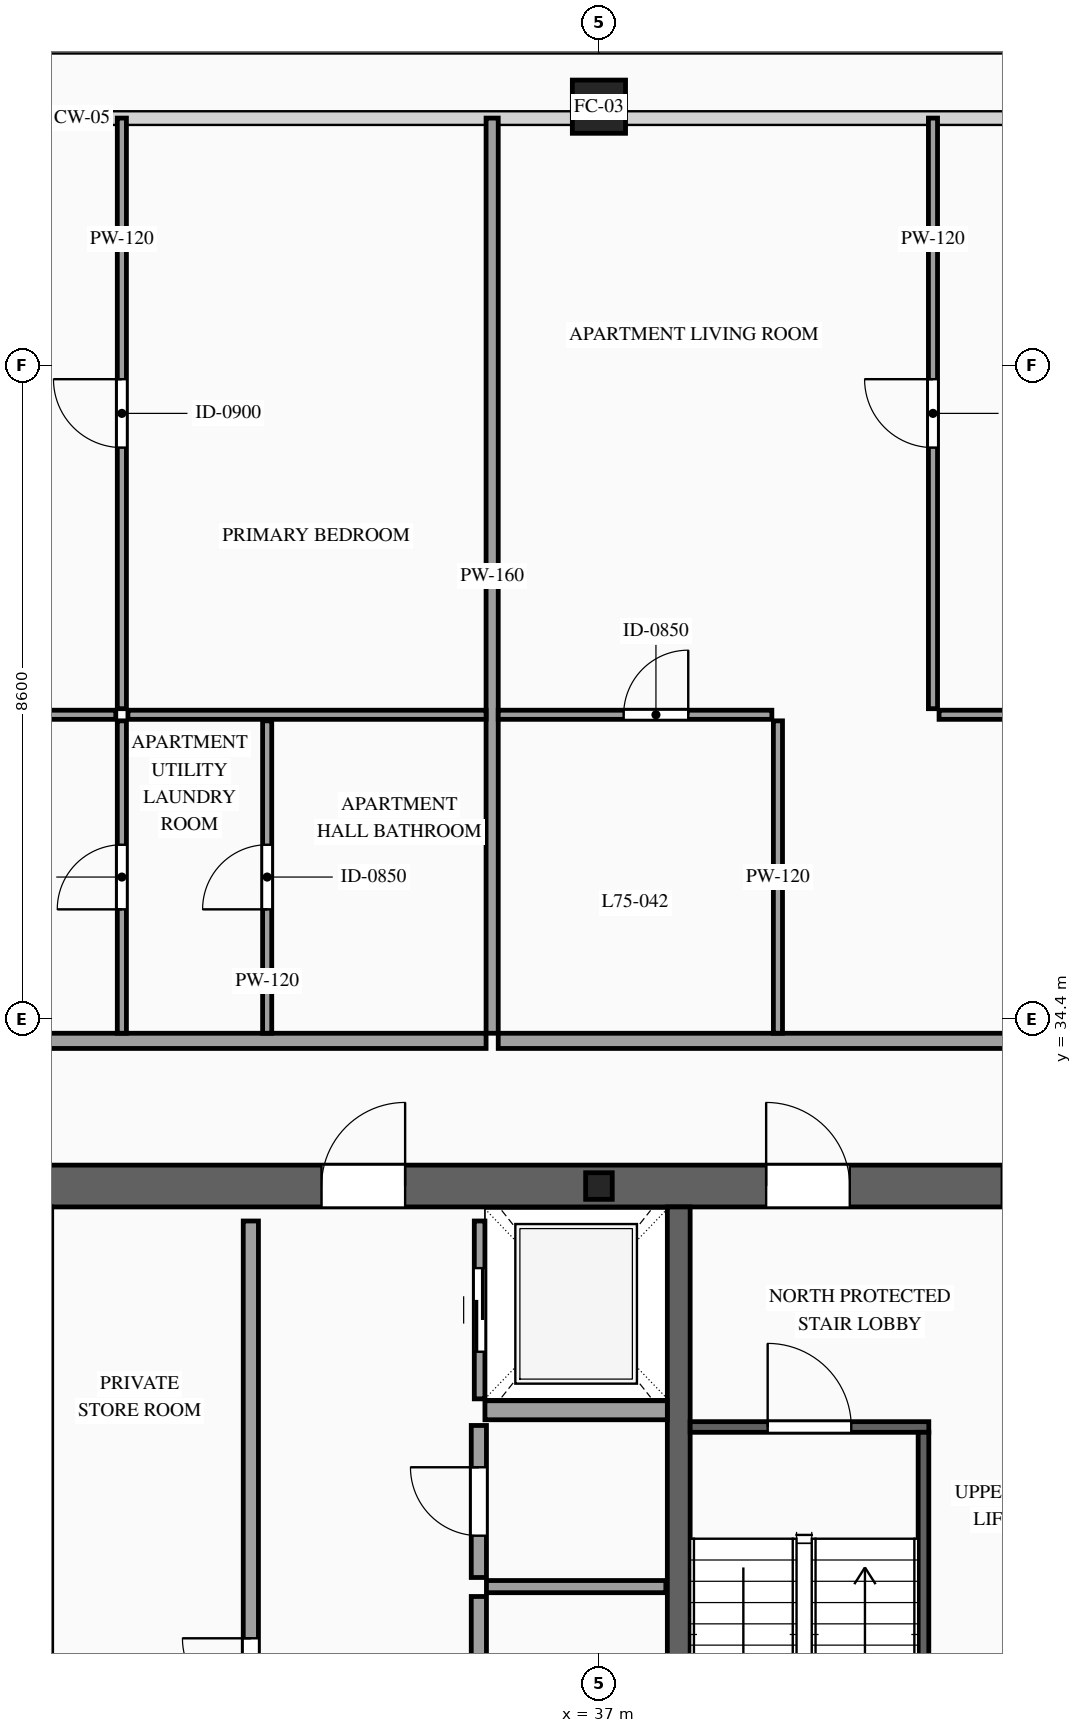
"""IFC4 building model, lengths in metres.
Left out: names, types, materials, properties, quantities, classifications, styles, units other than length and angle.
Written with IfcOpenShell. Run it as: python <this file> out.ifc"""

import sys

from ifc_helpers import new_model, si_unit, direction, frame, frame_2d, origin, origin_2d, place, context, subcontext, project, spatial, rectangle, hollow_rectangle, i_section, extrude, source, transform, mapped, element, fill, save


model = new_model("IFC4")
c1 = context("Model", 3, precision=1e-05, world=origin(), true_north=direction((0.0, 1.0)))
c2 = subcontext(c1, "Body", "Model", "MODEL_VIEW")
j1 = project(units=[si_unit("LENGTHUNIT", "METRE"), si_unit("PLANEANGLEUNIT", "RADIAN")], contexts=[c1])
p1 = place(None, origin())
s1 = spatial("IfcSite", under=j1, at=p1, CompositionType="ELEMENT")
p2 = place(p1, origin())
s2 = spatial("IfcBuilding", under=s1, at=p2, CompositionType="ELEMENT")
p3 = place(p2, frame((0.0, 0.0, 282.1)))
s3 = spatial("IfcBuildingStorey", under=s2, at=p3, CompositionType="ELEMENT", Elevation=282.1)
p4 = place(p3, frame((23.525, 32.2, 0.0), z_axis=(0.0, 0.0, 1.0), x_axis=(1.0, 0.0, 0.0)))
e1 = element("IfcWall", 1, at=p4, inside=s3, PredefinedType="SHEAR", context=c2, shape_type="SweptSolid", body=[
    extrude(rectangle(XDim=26.95, YDim=0.55, at=frame_2d((13.475, 0.0))), origin(), (0.0, 0.0, 1.0), 3.5),
])
p5 = place(p4, frame((4.545, 0.0, 0.0)))
e2 = element("IfcOpeningElement", 2, at=p5, cuts=e1, PredefinedType="OPENING", context=c2, shape_type="SweptSolid", body=[
    extrude(rectangle(XDim=0.9, YDim=2.15, at=frame_2d((0.45, 1.075))), frame((0.0, 0.29, 0.0), z_axis=(0.0, -1.0, 0.0), x_axis=(1.0, 0.0, 0.0)), (0.0, 0.0, 1.0), 0.58),
])
p6 = place(p4, frame((9.825, 0.0, 0.0)))
e3 = element("IfcOpeningElement", 3, at=p6, cuts=e1, PredefinedType="OPENING", context=c2, shape_type="SweptSolid", body=[
    extrude(rectangle(XDim=1.1, YDim=2.2, at=frame_2d((0.55, 1.1))), frame((0.0, 0.29, 0.0), z_axis=(0.0, -1.0, 0.0), x_axis=(1.0, 0.0, 0.0)), (0.0, 0.0, 1.0), 0.58),
])
p7 = place(p4, frame((15.675, 0.0, 0.0)))
e4 = element("IfcOpeningElement", 4, at=p7, cuts=e1, PredefinedType="OPENING", context=c2, shape_type="SweptSolid", body=[
    extrude(rectangle(XDim=1.1, YDim=2.2, at=frame_2d((0.55, 1.1))), frame((0.0, 0.29, 0.0), z_axis=(0.0, -1.0, 0.0), x_axis=(1.0, 0.0, 0.0)), (0.0, 0.0, 1.0), 0.58),
])
p8 = place(p4, frame((18.775, 0.0, 0.0)))
e5 = element("IfcOpeningElement", 5, at=p8, cuts=e1, PredefinedType="OPENING", context=c2, shape_type="SweptSolid", body=[
    extrude(rectangle(XDim=1.1, YDim=2.2, at=frame_2d((0.55, 1.1))), frame((0.0, 0.29, 0.0), z_axis=(0.0, -1.0, 0.0), x_axis=(1.0, 0.0, 0.0)), (0.0, 0.0, 1.0), 0.58),
])
m1 = source(origin(), c2, "Body", "SweptSolid", [
    extrude(rectangle(XDim=12.25, YDim=0.3, at=frame_2d((6.125, 0.0))), origin(), (0.0, 0.0, 1.0), 3.5),
])
p9 = place(p3, frame((38.05, 19.675, 0.0), z_axis=(0.0, 0.0, 1.0), x_axis=(0.0, 1.0, 0.0)))
e6 = element("IfcWall", 6, at=p9, inside=s3, PredefinedType="SOLIDWALL", context=c2, shape_type="MappedRepresentation", body=[
    mapped(m1, transform((0.0, 0.0, 0.0), scale=1.0)),
])
m2 = source(origin(), c2, "Body", "SweptSolid", [
    extrude(i_section(OverallWidth=0.35, OverallDepth=0.35, WebThickness=0.012, FlangeThickness=0.019, at=origin_2d()), origin(), (0.0, 0.0, 1.0), 3.5),
])
p10 = place(p3, frame((37.0, 32.2, 0.0), z_axis=(0.0, 0.0, 1.0), x_axis=(1.0, 0.0, 0.0)))
e7 = element("IfcColumn", 7, at=p10, inside=s3, PredefinedType="COLUMN", context=c2, shape_type="MappedRepresentation", body=[
    mapped(m2, transform((0.0, 0.0, 0.0), scale=1.0)),
])
m3 = source(origin(), c2, "Body", "SweptSolid", [
    extrude(hollow_rectangle(XDim=0.7, YDim=0.7, WallThickness=0.032, at=origin_2d()), origin(), (0.0, 0.0, 1.0), 3.28),
])
p11 = place(p3, frame((37.0, 46.4, 0.0), z_axis=(0.0, 0.0, 1.0), x_axis=(1.0, 0.0, 0.0)))
e8 = element("IfcColumn", 8, at=p11, inside=s3, PredefinedType="COLUMN", context=c2, shape_type="MappedRepresentation", body=[
    mapped(m3, transform((0.0, 0.0, 0.0), scale=1.0)),
])
p12 = place(p3, frame((35.43, 29.4, 0.0), z_axis=(0.0, 0.0, 1.0), x_axis=(0.0, 1.0, 0.0)))
e9 = element("IfcWall", 9, at=p12, inside=s3, PredefinedType="SOLIDWALL", context=c2, shape_type="SweptSolid", body=[
    extrude(rectangle(XDim=2.34, YDim=0.14, at=frame_2d((1.17, 0.0))), origin(), (0.0, 0.0, 1.0), 3.28),
])
p13 = place(p12, frame((0.62, 0.0, 0.0)))
e10 = element("IfcOpeningElement", 10, at=p13, cuts=e9, PredefinedType="OPENING", context=c2, shape_type="SweptSolid", body=[
    extrude(rectangle(XDim=1.1, YDim=2.2, at=frame_2d((0.55, 1.1))), frame((0.0, 0.085, 0.0), z_axis=(0.0, -1.0, 0.0), x_axis=(1.0, 0.0, 0.0)), (0.0, 0.0, 1.0), 0.17),
])
m4 = source(origin(), c2, "Body", "SweptSolid", [
    extrude(rectangle(XDim=2.4, YDim=0.25, at=frame_2d((1.2, 0.0))), origin(), (0.0, 0.0, 1.0), 3.28),
])
p14 = place(p3, frame((35.5, 29.25, 0.0), z_axis=(0.0, 0.0, 1.0), x_axis=(1.0, 0.0, 0.0)))
e11 = element("IfcWall", 11, at=p14, inside=s3, PredefinedType="SOLIDWALL", context=c2, shape_type="MappedRepresentation", body=[
    mapped(m4, transform((0.0, 0.0, 0.0), scale=1.0)),
])
p15 = place(p3, frame((38.2, 29.03, 0.0), z_axis=(0.0, 0.0, 1.0), x_axis=(1.0, 0.0, 0.0)))
e12 = element("IfcWall", 12, at=p15, inside=s3, PredefinedType="SOLIDWALL", context=c2, shape_type="SweptSolid", body=[
    extrude(rectangle(XDim=3.14, YDim=0.14, at=frame_2d((1.57, 0.0))), origin(), (0.0, 0.0, 1.0), 3.28),
])
p16 = place(p15, frame((1.02, 0.0, 0.0)))
e13 = element("IfcOpeningElement", 13, at=p16, cuts=e12, PredefinedType="OPENING", context=c2, shape_type="SweptSolid", body=[
    extrude(rectangle(XDim=1.1, YDim=2.2, at=frame_2d((0.55, 1.1))), frame((0.0, 0.085, 0.0), z_axis=(0.0, -1.0, 0.0), x_axis=(1.0, 0.0, 0.0)), (0.0, 0.0, 1.0), 0.17),
])
m5 = source(origin(), c2, "Body", "SweptSolid", [
    extrude(rectangle(XDim=8.94, YDim=0.14, at=frame_2d((4.47, 0.0))), origin(), (0.0, 0.0, 1.0), 3.28),
])
p17 = place(p3, frame((41.27, 20.02, 0.0), z_axis=(0.0, 0.0, 1.0), x_axis=(0.0, 1.0, 0.0)))
e14 = element("IfcWall", 14, at=p17, inside=s3, PredefinedType="SOLIDWALL", context=c2, shape_type="MappedRepresentation", body=[
    mapped(m5, transform((0.0, 0.0, 0.0), scale=1.0)),
])
p18 = place(p3, frame((32.42, 19.86, 0.0), z_axis=(0.0, 0.0, 1.0), x_axis=(0.0, 1.0, 0.0)))
e15 = element("IfcWall", 15, at=p18, inside=s3, PredefinedType="PARTITIONING", context=c2, shape_type="SweptSolid", body=[
    extrude(rectangle(XDim=11.88, YDim=0.2, at=frame_2d((5.94, 0.0))), origin(), (0.0, 0.0, 1.0), 3.28),
])
p19 = place(p18, frame((5.49, 0.0, 0.0)))
e16 = element("IfcOpeningElement", 16, at=p19, cuts=e15, PredefinedType="OPENING", context=c2, shape_type="SweptSolid", body=[
    extrude(rectangle(XDim=0.9, YDim=2.15, at=frame_2d((0.45, 1.075))), frame((0.0, 0.115, 0.0), z_axis=(0.0, -1.0, 0.0), x_axis=(1.0, 0.0, 0.0)), (0.0, 0.0, 1.0), 0.23),
])
p20 = place(p3, frame((35.42, 19.86, 0.0), z_axis=(0.0, 0.0, 1.0), x_axis=(0.0, 1.0, 0.0)))
e17 = element("IfcWall", 17, at=p20, inside=s3, PredefinedType="PARTITIONING", context=c2, shape_type="SweptSolid", body=[
    extrude(rectangle(XDim=6.94, YDim=0.2, at=frame_2d((3.47, 0.0))), origin(), (0.0, 0.0, 1.0), 3.28),
])
p21 = place(p20, frame((3.02, 0.0, 0.0)))
e18 = element("IfcOpeningElement", 18, at=p21, cuts=e17, PredefinedType="OPENING", context=c2, shape_type="SweptSolid", body=[
    extrude(rectangle(XDim=0.9, YDim=2.15, at=frame_2d((0.45, 1.075))), frame((0.0, 0.115, 0.0), z_axis=(0.0, -1.0, 0.0), x_axis=(1.0, 0.0, 0.0)), (0.0, 0.0, 1.0), 0.23),
])
p22 = place(p3, frame((35.42, 27.05, 0.0), z_axis=(0.0, 0.0, 1.0), x_axis=(0.0, 1.0, 0.0)))
e19 = element("IfcWall", 19, at=p22, inside=s3, PredefinedType="PARTITIONING", context=c2, shape_type="SweptSolid", body=[
    extrude(rectangle(XDim=2.0, YDim=0.2, at=frame_2d((1.0, 0.0))), origin(), (0.0, 0.0, 1.0), 3.28),
])
p23 = place(p22, frame((0.55, 0.0, 0.0)))
e20 = element("IfcOpeningElement", 20, at=p23, cuts=e19, PredefinedType="OPENING", context=c2, shape_type="SweptSolid", body=[
    extrude(rectangle(XDim=0.9, YDim=2.15, at=frame_2d((0.45, 1.075))), frame((0.0, 0.115, 0.0), z_axis=(0.0, -1.0, 0.0), x_axis=(1.0, 0.0, 0.0)), (0.0, 0.0, 1.0), 0.23),
])
m6 = source(origin(), c2, "Body", "SweptSolid", [
    extrude(rectangle(XDim=2.36, YDim=0.16, at=frame_2d((1.18, 0.0))), origin(), (0.0, 0.0, 1.0), 3.28),
])
p24 = place(p3, frame((35.52, 26.93, 0.0), z_axis=(0.0, 0.0, 1.0), x_axis=(1.0, 0.0, 0.0)))
e21 = element("IfcWall", 21, at=p24, inside=s3, PredefinedType="PARTITIONING", context=c2, shape_type="MappedRepresentation", body=[
    mapped(m6, transform((0.0, 0.0, 0.0), scale=1.0)),
])
p25 = place(p3, frame((19.44, 34.11, 0.0), z_axis=(0.0, 0.0, 1.0), x_axis=(1.0, 0.0, 0.0)))
e22 = element("IfcWall", 22, at=p25, inside=s3, PredefinedType="PARTITIONING", context=c2, shape_type="SweptSolid", body=[
    extrude(rectangle(XDim=16.075, YDim=0.2, at=frame_2d((8.038, 0.0))), origin(), (0.0, 0.0, 1.0), 3.28),
])
p26 = place(p25, frame((6.982, 0.0, 0.0)))
e23 = element("IfcOpeningElement", 23, at=p26, cuts=e22, PredefinedType="OPENING", context=c2, shape_type="SweptSolid", body=[
    extrude(rectangle(XDim=1.0, YDim=2.2, at=frame_2d((0.5, 1.1))), frame((0.0, 0.115, 0.0), z_axis=(0.0, -1.0, 0.0), x_axis=(1.0, 0.0, 0.0)), (0.0, 0.0, 1.0), 0.23),
])
m7 = source(origin(), c2, "Body", "SweptSolid", [
    extrude(rectangle(XDim=12.04, YDim=0.16, at=frame_2d((6.02, 0.0))), origin(), (0.0, 0.0, 1.0), 3.28),
])
p27 = place(p3, frame((35.595, 34.21, 0.0), z_axis=(0.0, 0.0, 1.0), x_axis=(0.0, 1.0, 0.0)))
e24 = element("IfcWall", 24, at=p27, inside=s3, PredefinedType="PARTITIONING", context=c2, shape_type="MappedRepresentation", body=[
    mapped(m7, transform((0.0, 0.0, 0.0), scale=1.0)),
])
p28 = place(p3, frame((32.635, 34.21, 0.0), z_axis=(0.0, 0.0, 1.0), x_axis=(0.0, 1.0, 0.0)))
e25 = element("IfcWall", 25, at=p28, inside=s3, PredefinedType="PARTITIONING", context=c2, shape_type="SweptSolid", body=[
    extrude(rectangle(XDim=4.11, YDim=0.12, at=frame_2d((2.055, 0.0))), origin(), (0.0, 0.0, 1.0), 3.28),
])
p29 = place(p28, frame((1.63, 0.0, 0.0)))
e26 = element("IfcOpeningElement", 26, at=p29, cuts=e25, PredefinedType="OPENING", context=c2, shape_type="SweptSolid", body=[
    extrude(rectangle(XDim=0.85, YDim=2.1, at=frame_2d((0.425, 1.05))), frame((0.0, 0.075, 0.0), z_axis=(0.0, -1.0, 0.0), x_axis=(1.0, 0.0, 0.0)), (0.0, 0.0, 1.0), 0.15),
])
m8 = source(origin(), c2, "Body", "SweptSolid", [
    extrude(rectangle(XDim=4.712, YDim=0.12, at=frame_2d((2.356, 0.0))), origin(), (0.0, 0.0, 1.0), 3.28),
])
p30 = place(p3, frame((30.803, 38.4, 0.0), z_axis=(0.0, 0.0, 1.0), x_axis=(1.0, 0.0, 0.0)))
e27 = element("IfcWall", 27, at=p30, inside=s3, PredefinedType="PARTITIONING", context=c2, shape_type="MappedRepresentation", body=[
    mapped(m8, transform((0.0, 0.0, 0.0), scale=1.0)),
])
p31 = place(p3, frame((30.723, 38.48, 0.0), z_axis=(0.0, 0.0, 1.0), x_axis=(0.0, 1.0, 0.0)))
e28 = element("IfcWall", 28, at=p31, inside=s3, PredefinedType="PARTITIONING", context=c2, shape_type="SweptSolid", body=[
    extrude(rectangle(XDim=7.77, YDim=0.12, at=frame_2d((3.885, 0.0))), origin(), (0.0, 0.0, 1.0), 3.28),
])
p32 = place(p31, frame((3.435, 0.0, 0.0)))
e29 = element("IfcOpeningElement", 29, at=p32, cuts=e28, PredefinedType="OPENING", context=c2, shape_type="SweptSolid", body=[
    extrude(rectangle(XDim=0.9, YDim=2.15, at=frame_2d((0.45, 1.075))), frame((0.0, 0.075, 0.0), z_axis=(0.0, -1.0, 0.0), x_axis=(1.0, 0.0, 0.0)), (0.0, 0.0, 1.0), 0.15),
])
p33 = place(p3, frame((30.723, 34.21, 0.0), z_axis=(0.0, 0.0, 1.0), x_axis=(0.0, 1.0, 0.0)))
e30 = element("IfcWall", 30, at=p33, inside=s3, PredefinedType="PARTITIONING", context=c2, shape_type="SweptSolid", body=[
    extrude(rectangle(XDim=4.11, YDim=0.12, at=frame_2d((2.055, 0.0))), origin(), (0.0, 0.0, 1.0), 3.28),
])
p34 = place(p33, frame((1.63, 0.0, 0.0)))
e31 = element("IfcOpeningElement", 31, at=p34, cuts=e30, PredefinedType="OPENING", context=c2, shape_type="SweptSolid", body=[
    extrude(rectangle(XDim=0.85, YDim=2.1, at=frame_2d((0.425, 1.05))), frame((0.0, 0.075, 0.0), z_axis=(0.0, -1.0, 0.0), x_axis=(1.0, 0.0, 0.0)), (0.0, 0.0, 1.0), 0.15),
])
m9 = source(origin(), c2, "Body", "SweptSolid", [
    extrude(rectangle(XDim=5.403, YDim=0.12, at=frame_2d((2.702, 0.0))), origin(), (0.0, 0.0, 1.0), 3.28),
])
p35 = place(p3, frame((25.24, 38.4, 0.0), z_axis=(0.0, 0.0, 1.0), x_axis=(1.0, 0.0, 0.0)))
e32 = element("IfcWall", 32, at=p35, inside=s3, PredefinedType="PARTITIONING", context=c2, shape_type="MappedRepresentation", body=[
    mapped(m9, transform((0.0, 0.0, 0.0), scale=1.0)),
])
p36 = place(p3, frame((35.675, 34.11, 0.0), z_axis=(0.0, 0.0, 1.0), x_axis=(1.0, 0.0, 0.0)))
e33 = element("IfcWall", 33, at=p36, inside=s3, PredefinedType="PARTITIONING", context=c2, shape_type="SweptSolid", body=[
    extrude(rectangle(XDim=18.885, YDim=0.2, at=frame_2d((9.442, 0.0))), origin(), (0.0, 0.0, 1.0), 3.28),
])
p37 = place(p36, frame((6.668, 0.0, 0.0)))
e34 = element("IfcOpeningElement", 34, at=p37, cuts=e33, PredefinedType="OPENING", context=c2, shape_type="SweptSolid", body=[
    extrude(rectangle(XDim=1.0, YDim=2.2, at=frame_2d((0.5, 1.1))), frame((0.0, 0.115, 0.0), z_axis=(0.0, -1.0, 0.0), x_axis=(1.0, 0.0, 0.0)), (0.0, 0.0, 1.0), 0.23),
])
p38 = place(p3, frame((35.675, 38.4, 0.0), z_axis=(0.0, 0.0, 1.0), x_axis=(1.0, 0.0, 0.0)))
e35 = element("IfcWall", 35, at=p38, inside=s3, PredefinedType="PARTITIONING", context=c2, shape_type="SweptSolid", body=[
    extrude(rectangle(XDim=3.6, YDim=0.12, at=frame_2d((1.8, 0.0))), origin(), (0.0, 0.0, 1.0), 3.28),
])
p39 = place(p38, frame((1.65, 0.0, 0.0)))
e36 = element("IfcOpeningElement", 36, at=p39, cuts=e35, PredefinedType="OPENING", context=c2, shape_type="SweptSolid", body=[
    extrude(rectangle(XDim=0.85, YDim=2.1, at=frame_2d((0.425, 1.05))), frame((0.0, 0.075, 0.0), z_axis=(0.0, -1.0, 0.0), x_axis=(1.0, 0.0, 0.0)), (0.0, 0.0, 1.0), 0.15),
])
m10 = source(origin(), c2, "Body", "SweptSolid", [
    extrude(rectangle(XDim=4.11, YDim=0.12, at=frame_2d((2.055, 0.0))), origin(), (0.0, 0.0, 1.0), 3.28),
])
p40 = place(p3, frame((39.355, 34.21, 0.0), z_axis=(0.0, 0.0, 1.0), x_axis=(0.0, 1.0, 0.0)))
e37 = element("IfcWall", 37, at=p40, inside=s3, PredefinedType="PARTITIONING", context=c2, shape_type="MappedRepresentation", body=[
    mapped(m10, transform((0.0, 0.0, 0.0), scale=1.0)),
])
m11 = source(origin(), c2, "Body", "SweptSolid", [
    extrude(rectangle(XDim=8.213, YDim=0.12, at=frame_2d((4.106, 0.0))), origin(), (0.0, 0.0, 1.0), 3.28),
])
p41 = place(p3, frame((41.475, 38.4, 0.0), z_axis=(0.0, 0.0, 1.0), x_axis=(1.0, 0.0, 0.0)))
e38 = element("IfcWall", 38, at=p41, inside=s3, PredefinedType="PARTITIONING", context=c2, shape_type="MappedRepresentation", body=[
    mapped(m11, transform((0.0, 0.0, 0.0), scale=1.0)),
])
p42 = place(p3, frame((41.395, 38.48, 0.0), z_axis=(0.0, 0.0, 1.0), x_axis=(0.0, 1.0, 0.0)))
e39 = element("IfcWall", 39, at=p42, inside=s3, PredefinedType="PARTITIONING", context=c2, shape_type="SweptSolid", body=[
    extrude(rectangle(XDim=7.77, YDim=0.12, at=frame_2d((3.885, 0.0))), origin(), (0.0, 0.0, 1.0), 3.28),
])
p43 = place(p42, frame((3.435, 0.0, 0.0)))
e40 = element("IfcOpeningElement", 40, at=p43, cuts=e39, PredefinedType="OPENING", context=c2, shape_type="SweptSolid", body=[
    extrude(rectangle(XDim=0.9, YDim=2.15, at=frame_2d((0.45, 1.075))), frame((0.0, 0.075, 0.0), z_axis=(0.0, -1.0, 0.0), x_axis=(1.0, 0.0, 0.0)), (0.0, 0.0, 1.0), 0.15),
])
m12 = source(origin(), c2, "Body", "SweptSolid", [
    extrude(rectangle(XDim=1.1, YDim=2.2, at=frame_2d((0.55, 1.1))), frame((0.0, 0.025, 0.0), z_axis=(0.0, -1.0, 0.0), x_axis=(1.0, 0.0, 0.0)), (0.0, 0.0, 1.0), 0.05),
])
p44 = place(p13, origin())
e41 = element("IfcDoor", 41, at=p44, inside=s3, OperationType="SLIDING_TO_RIGHT", PredefinedType="DOOR", context=c2, shape_type="MappedRepresentation", body=[
    mapped(m12, transform((0.0, 0.0, 0.0), scale=1.0)),
])
fill(e10, e41)
m13 = source(origin(), c2, "Body", "SweptSolid", [
    extrude(rectangle(XDim=1.1, YDim=2.2, at=frame_2d((0.55, 1.1))), frame((0.0, 0.025, 0.0), z_axis=(0.0, -1.0, 0.0), x_axis=(1.0, 0.0, 0.0)), (0.0, 0.0, 1.0), 0.05),
])
p45 = place(p16, origin())
e42 = element("IfcDoor", 42, at=p45, inside=s3, OperationType="SINGLE_SWING_LEFT", PredefinedType="DOOR", context=c2, shape_type="MappedRepresentation", body=[
    mapped(m13, transform((0.0, 0.0, 0.0), scale=1.0)),
])
fill(e13, e42)
p46 = place(p6, origin())
e43 = element("IfcDoor", 43, at=p46, inside=s3, OperationType="SINGLE_SWING_RIGHT", PredefinedType="DOOR", context=c2, shape_type="MappedRepresentation", body=[
    mapped(m13, transform((0.0, 0.0, 0.0), scale=1.0)),
])
fill(e3, e43)
p47 = place(p7, origin())
e44 = element("IfcDoor", 44, at=p47, inside=s3, OperationType="SINGLE_SWING_LEFT", PredefinedType="DOOR", context=c2, shape_type="MappedRepresentation", body=[
    mapped(m13, transform((0.0, 0.0, 0.0), scale=1.0)),
])
fill(e4, e44)
p48 = place(p8, origin())
e45 = element("IfcDoor", 45, at=p48, inside=s3, OperationType="SINGLE_SWING_RIGHT", PredefinedType="DOOR", context=c2, shape_type="MappedRepresentation", body=[
    mapped(m13, transform((0.0, 0.0, 0.0), scale=1.0)),
])
fill(e5, e45)
m14 = source(origin(), c2, "Body", "SweptSolid", [
    extrude(rectangle(XDim=0.9, YDim=2.15, at=frame_2d((0.45, 1.075))), frame((0.0, 0.025, 0.0), z_axis=(0.0, -1.0, 0.0), x_axis=(1.0, 0.0, 0.0)), (0.0, 0.0, 1.0), 0.05),
])
p49 = place(p19, origin())
e46 = element("IfcDoor", 46, at=p49, inside=s3, OperationType="SINGLE_SWING_RIGHT", PredefinedType="DOOR", context=c2, shape_type="MappedRepresentation", body=[
    mapped(m14, transform((0.0, 0.0, 0.0), scale=1.0)),
])
fill(e16, e46)
p50 = place(p23, origin())
e47 = element("IfcDoor", 47, at=p50, inside=s3, OperationType="SINGLE_SWING_RIGHT", PredefinedType="DOOR", context=c2, shape_type="MappedRepresentation", body=[
    mapped(m14, transform((0.0, 0.0, 0.0), scale=1.0)),
])
fill(e20, e47)
m15 = source(origin(), c2, "Body", "SweptSolid", [
    extrude(rectangle(XDim=0.85, YDim=2.1, at=frame_2d((0.425, 1.05))), frame((0.0, 0.025, 0.0), z_axis=(0.0, -1.0, 0.0), x_axis=(1.0, 0.0, 0.0)), (0.0, 0.0, 1.0), 0.05),
])
p51 = place(p29, origin())
e48 = element("IfcDoor", 48, at=p51, inside=s3, OperationType="SINGLE_SWING_LEFT", PredefinedType="DOOR", context=c2, shape_type="MappedRepresentation", body=[
    mapped(m15, transform((0.0, 0.0, 0.0), scale=1.0)),
])
fill(e26, e48)
m16 = source(origin(), c2, "Body", "SweptSolid", [
    extrude(rectangle(XDim=0.9, YDim=2.15, at=frame_2d((0.45, 1.075))), frame((0.0, 0.025, 0.0), z_axis=(0.0, -1.0, 0.0), x_axis=(1.0, 0.0, 0.0)), (0.0, 0.0, 1.0), 0.05),
])
p52 = place(p32, origin())
e49 = element("IfcDoor", 49, at=p52, inside=s3, OperationType="SINGLE_SWING_RIGHT", PredefinedType="DOOR", context=c2, shape_type="MappedRepresentation", body=[
    mapped(m16, transform((0.0, 0.0, 0.0), scale=1.0)),
])
fill(e29, e49)
p53 = place(p34, origin())
e50 = element("IfcDoor", 50, at=p53, inside=s3, OperationType="SINGLE_SWING_LEFT", PredefinedType="DOOR", context=c2, shape_type="MappedRepresentation", body=[
    mapped(m15, transform((0.0, 0.0, 0.0), scale=1.0)),
])
fill(e31, e50)
p54 = place(p39, origin())
e51 = element("IfcDoor", 51, at=p54, inside=s3, OperationType="SINGLE_SWING_RIGHT", PredefinedType="DOOR", context=c2, shape_type="MappedRepresentation", body=[
    mapped(m15, transform((0.0, 0.0, 0.0), scale=1.0)),
])
fill(e36, e51)
p55 = place(p43, origin())
e52 = element("IfcDoor", 52, at=p55, inside=s3, OperationType="SINGLE_SWING_RIGHT", PredefinedType="DOOR", context=c2, shape_type="MappedRepresentation", body=[
    mapped(m16, transform((0.0, 0.0, 0.0), scale=1.0)),
])
fill(e40, e52)
save(model, sys.argv[1])
